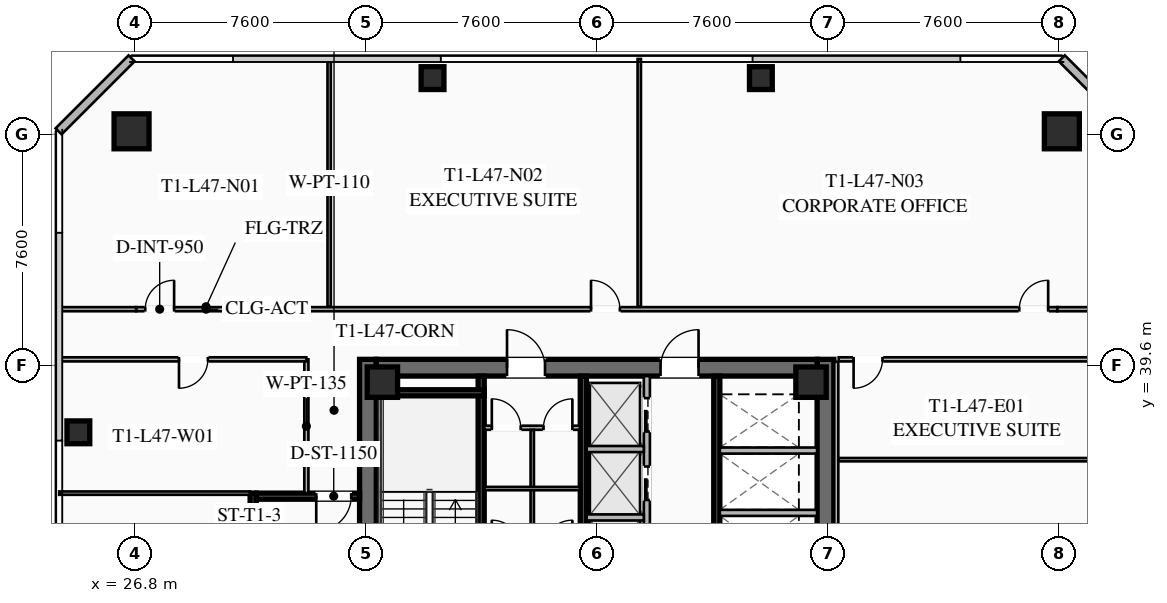
"""IFC4 building model, lengths in metres.
Left out: names, types, materials, properties, quantities, classifications, styles, units other than length and angle.
Written with IfcOpenShell. Run it as: python <this file> out.ifc"""

import sys

from ifc_helpers import new_model, si_unit, direction, frame, frame_2d, origin, origin_2d, place, context, subcontext, project, spatial, rectangle, hollow_rectangle, extrude, element, fill, save


model = new_model("IFC4")
c1 = context("Model", 3, precision=1e-05, world=origin(), true_north=direction((0.0, 1.0)))
c2 = subcontext(c1, "Body", "Model", "MODEL_VIEW")
j1 = project(units=[si_unit("LENGTHUNIT", "METRE"), si_unit("PLANEANGLEUNIT", "RADIAN")], contexts=[c1])
p1 = place(None, origin())
s1 = spatial("IfcSite", under=j1, at=p1, CompositionType="ELEMENT")
p2 = place(p1, origin())
s2 = spatial("IfcBuilding", under=s1, at=p2, CompositionType="ELEMENT")
p3 = place(p2, frame((0.0, 0.0, 174.75)))
s3 = spatial("IfcBuildingStorey", under=s2, at=p3, CompositionType="ELEMENT", Elevation=174.75)
for number, where, z_axis, x_axis in (
    (1, (34.475, 24.2, 0.0), (0.0, 0.0, 1.0), (0.0, 1.0, 0.0)),
    (2, (49.525, 39.8, 0.0), (0.0, 0.0, 1.0), (0.0, -1.0, 0.0)),
):
    element("IfcWall", number, at=place(p3, frame(where, z_axis=z_axis, x_axis=x_axis)), inside=s3, PredefinedType="SHEAR", context=c2, shape_type="SweptSolid", body=[
        extrude(rectangle(XDim=15.6, YDim=0.55, at=frame_2d((7.8, 0.0))), origin(), (0.0, 0.0, 1.0), 3.55),
    ])
p4 = place(p3, frame((34.75, 39.525, 0.0), z_axis=(0.0, 0.0, 1.0), x_axis=(1.0, 0.0, 0.0)))
e3 = element("IfcWall", 3, at=p4, inside=s3, PredefinedType="SHEAR", context=c2, shape_type="SweptSolid", body=[
    extrude(rectangle(XDim=14.5, YDim=0.55, at=frame_2d((7.25, 0.0))), origin(), (0.0, 0.0, 1.0), 3.55),
])
p5 = place(p4, frame((4.3, 0.0, 0.0)))
e4 = element("IfcOpeningElement", 4, at=p5, cuts=e3, PredefinedType="OPENING", context=c2, shape_type="SweptSolid", body=[
    extrude(rectangle(XDim=1.25, YDim=2.25, at=frame_2d((0.625, 1.125))), frame((0.0, 0.285, 0.0), z_axis=(0.0, -1.0, 0.0), x_axis=(1.0, 0.0, 0.0)), (0.0, 0.0, 1.0), 0.57),
])
p6 = place(p4, frame((9.35, 0.0, 0.0)))
e5 = element("IfcOpeningElement", 5, at=p6, cuts=e3, PredefinedType="OPENING", context=c2, shape_type="SweptSolid", body=[
    extrude(rectangle(XDim=1.25, YDim=2.25, at=frame_2d((0.625, 1.125))), frame((0.0, 0.285, 0.0), z_axis=(0.0, -1.0, 0.0), x_axis=(1.0, 0.0, 0.0)), (0.0, 0.0, 1.0), 0.57),
])
for number, where, z_axis, x_axis in (
    (6, (49.05, 39.05, 0.0), (0.0, 0.0, 1.0), (1.0, 0.0, 0.0)),
    (7, (34.95, 39.05, 0.0), (0.0, 0.0, 1.0), (1.0, 0.0, 0.0)),
):
    element("IfcColumn", number, at=place(p3, frame(where, z_axis=z_axis, x_axis=x_axis)), inside=s3, PredefinedType="COLUMN", context=c2, shape_type="SweptSolid", body=[
        extrude(hollow_rectangle(XDim=1.0, YDim=1.0, WallThickness=0.04, at=origin_2d()), origin(), (0.0, 0.0, 1.0), 3.37),
    ])
for number, where, z_axis, x_axis in (
    (8, (57.3, 47.3, 0.0), (0.0, 0.0, 1.0), (1.0, 0.0, 0.0)),
    (9, (26.7, 47.3, 0.0), (0.0, 0.0, 1.0), (1.0, 0.0, 0.0)),
):
    element("IfcColumn", number, at=place(p3, frame(where, z_axis=z_axis, x_axis=x_axis)), inside=s3, PredefinedType="COLUMN", context=c2, shape_type="SweptSolid", body=[
        extrude(hollow_rectangle(XDim=1.15, YDim=1.15, WallThickness=0.045, at=origin_2d()), origin(), (0.0, 0.0, 1.0), 3.37),
    ])
for number, where, z_axis, x_axis in (
    (10, (47.4, 49.05, 0.0), (0.0, 0.0, 1.0), (1.0, 0.0, 0.0)),
    (11, (36.6, 49.05, 0.0), (0.0, 0.0, 1.0), (1.0, 0.0, 0.0)),
    (12, (24.95, 37.4, 0.0), (0.0, 0.0, 1.0), (1.0, 0.0, 0.0)),
):
    element("IfcColumn", number, at=place(p3, frame(where, z_axis=z_axis, x_axis=x_axis)), inside=s3, PredefinedType="COLUMN", context=c2, shape_type="SweptSolid", body=[
        extrude(hollow_rectangle(XDim=0.75, YDim=0.75, WallThickness=0.032, at=origin_2d()), origin(), (0.0, 0.0, 1.0), 3.37),
    ])
for number, where, z_axis, x_axis in (
    (13, (24.3, 47.3, 0.0), (0.0, 0.0, 1.0), (0.707, 0.707, 0.0)),
    (14, (57.3, 49.7, 0.0), (0.0, 0.0, 1.0), (0.707, -0.707, 0.0)),
):
    element("IfcWall", number, at=place(p3, frame(where, z_axis=z_axis, x_axis=x_axis)), inside=s3, PredefinedType="SOLIDWALL", context=c2, shape_type="SweptSolid", body=[
        extrude(rectangle(XDim=3.394, YDim=0.28, at=frame_2d((1.697, 0.0))), origin(), (0.0, 0.0, 1.0), 3.37),
    ])
p7 = place(p3, frame((38.2, 31.2, 0.0), z_axis=(0.0, 0.0, 1.0), x_axis=(0.0, 1.0, 0.0)))
e15 = element("IfcWall", 15, at=p7, inside=s3, PredefinedType="SHEAR", context=c2, shape_type="SweptSolid", body=[
    extrude(rectangle(XDim=8.05, YDim=0.2, at=frame_2d((4.025, 0.0))), origin(), (0.0, 0.0, 1.0), 3.37),
])
p8 = place(p7, frame((0.45, 0.0, 0.0)))
e16 = element("IfcOpeningElement", 16, at=p8, cuts=e15, PredefinedType="OPENING", context=c2, shape_type="SweptSolid", body=[
    extrude(rectangle(XDim=1.15, YDim=2.2, at=frame_2d((0.575, 1.1))), frame((0.0, 0.11, 0.0), z_axis=(0.0, -1.0, 0.0), x_axis=(1.0, 0.0, 0.0)), (0.0, 0.0, 1.0), 0.22),
])
p9 = place(p3, frame((34.75, 38.7, 0.0), z_axis=(0.0, 0.0, 1.0), x_axis=(1.0, 0.0, 0.0)))
e17 = element("IfcWall", 17, at=p9, inside=s3, PredefinedType="SHEAR", context=c2, shape_type="SweptSolid", body=[
    extrude(rectangle(XDim=3.55, YDim=0.2, at=frame_2d((1.775, 0.0))), origin(), (0.0, 0.0, 1.0), 3.37),
])
p10 = place(p3, frame((41.56, 24.75, 0.0), z_axis=(0.0, 0.0, 1.0), x_axis=(0.0, 1.0, 0.0)))
e18 = element("IfcWall", 18, at=p10, inside=s3, PredefinedType="SHEAR", context=c2, shape_type="SweptSolid", body=[
    extrude(rectangle(XDim=14.5, YDim=0.2, at=frame_2d((7.25, 0.0))), origin(), (0.0, 0.0, 1.0), 3.37),
])
p11 = place(p3, frame((45.95, 39.25, 0.0), z_axis=(0.0, 0.0, 1.0), x_axis=(0.0, -1.0, 0.0)))
e19 = element("IfcWall", 19, at=p11, inside=s3, PredefinedType="SHEAR", context=c2, shape_type="SweptSolid", body=[
    extrude(rectangle(XDim=6.45, YDim=0.2, at=frame_2d((3.225, 0.0))), origin(), (0.0, 0.0, 1.0), 3.37),
])
for number, where, z_axis, x_axis in (
    (20, (46.05, 34.75, 0.0), (0.0, 0.0, 1.0), (1.0, 0.0, 0.0)),
    (21, (46.05, 36.8, 0.0), (0.0, 0.0, 1.0), (1.0, 0.0, 0.0)),
):
    element("IfcWall", number, at=place(p3, frame(where, z_axis=z_axis, x_axis=x_axis)), inside=s3, PredefinedType="SOLIDWALL", context=c2, shape_type="SweptSolid", body=[
        extrude(rectangle(XDim=3.2, YDim=0.2, at=frame_2d((1.6, 0.0))), origin(), (0.0, 0.0, 1.0), 3.37),
    ])
p12 = place(p3, frame((38.3, 37.55, 0.0), z_axis=(0.0, 0.0, 1.0), x_axis=(1.0, 0.0, 0.0)))
e22 = element("IfcWall", 22, at=p12, inside=s3, PredefinedType="PARTITIONING", context=c2, shape_type="SweptSolid", body=[
    extrude(rectangle(XDim=3.15, YDim=0.135, at=frame_2d((1.575, 0.0))), origin(), (0.0, 0.0, 1.0), 2.723),
])
p13 = place(p12, frame((0.25, 0.0, 0.0)))
e23 = element("IfcOpeningElement", 23, at=p13, cuts=e22, PredefinedType="OPENING", context=c2, shape_type="SweptSolid", body=[
    extrude(rectangle(XDim=0.95, YDim=2.05, at=frame_2d((0.475, 1.025))), frame((0.0, 0.077, 0.0), z_axis=(0.0, -1.0, 0.0), x_axis=(1.0, 0.0, 0.0)), (0.0, 0.0, 1.0), 0.155),
])
p14 = place(p12, frame((1.95, 0.0, 0.0)))
e24 = element("IfcOpeningElement", 24, at=p14, cuts=e22, PredefinedType="OPENING", context=c2, shape_type="SweptSolid", body=[
    extrude(rectangle(XDim=0.95, YDim=2.05, at=frame_2d((0.475, 1.025))), frame((0.0, 0.077, 0.0), z_axis=(0.0, -1.0, 0.0), x_axis=(1.0, 0.0, 0.0)), (0.0, 0.0, 1.0), 0.155),
])
p15 = place(p3, frame((39.88, 33.68, 0.0), z_axis=(0.0, 0.0, 1.0), x_axis=(0.0, 1.0, 0.0)))
e25 = element("IfcWall", 25, at=p15, inside=s3, PredefinedType="PARTITIONING", context=c2, shape_type="SweptSolid", body=[
    extrude(rectangle(XDim=3.8, YDim=0.11, at=frame_2d((1.9, 0.0))), origin(), (0.0, 0.0, 1.0), 2.723),
])
p16 = place(p3, frame((38.3, 35.55, 0.0), z_axis=(0.0, 0.0, 1.0), x_axis=(1.0, 0.0, 0.0)))
e26 = element("IfcWall", 26, at=p16, inside=s3, PredefinedType="PARTITIONING", context=c2, shape_type="SweptSolid", body=[
    extrude(rectangle(XDim=3.15, YDim=0.11, at=frame_2d((1.575, 0.0))), origin(), (0.0, 0.0, 1.0), 2.723),
])
p17 = place(p3, frame((43.65, 32.35, 0.0), z_axis=(0.0, 0.0, 1.0), x_axis=(0.0, 1.0, 0.0)))
e27 = element("IfcWall", 27, at=p17, inside=s3, PredefinedType="SOLIDWALL", context=c2, shape_type="SweptSolid", body=[
    extrude(rectangle(XDim=6.9, YDim=0.2, at=frame_2d((3.45, 0.0))), origin(), (0.0, 0.0, 1.0), 3.37),
])
p18 = place(p17, frame((0.575, 0.0, 0.0)))
e28 = element("IfcOpeningElement", 28, at=p18, cuts=e27, PredefinedType="OPENING", context=c2, shape_type="SweptSolid", body=[
    extrude(rectangle(XDim=1.1, YDim=2.2, at=frame_2d((0.55, 1.1))), frame((0.0, 0.11, 0.0), z_axis=(0.0, -1.0, 0.0), x_axis=(1.0, 0.0, 0.0)), (0.0, 0.0, 1.0), 0.22),
])
p19 = place(p17, frame((2.825, 0.0, 0.0)))
e29 = element("IfcOpeningElement", 29, at=p19, cuts=e27, PredefinedType="OPENING", context=c2, shape_type="SweptSolid", body=[
    extrude(rectangle(XDim=1.1, YDim=2.2, at=frame_2d((0.55, 1.1))), frame((0.0, 0.11, 0.0), z_axis=(0.0, -1.0, 0.0), x_axis=(1.0, 0.0, 0.0)), (0.0, 0.0, 1.0), 0.22),
])
p20 = place(p17, frame((5.075, 0.0, 0.0)))
e30 = element("IfcOpeningElement", 30, at=p20, cuts=e27, PredefinedType="OPENING", context=c2, shape_type="SweptSolid", body=[
    extrude(rectangle(XDim=1.1, YDim=2.2, at=frame_2d((0.55, 1.1))), frame((0.0, 0.11, 0.0), z_axis=(0.0, -1.0, 0.0), x_axis=(1.0, 0.0, 0.0)), (0.0, 0.0, 1.0), 0.22),
])
for number, where, z_axis, x_axis in (
    (31, (41.67, 34.6, 0.0), (0.0, 0.0, 1.0), (1.0, 0.0, 0.0)),
    (32, (41.67, 36.85, 0.0), (0.0, 0.0, 1.0), (1.0, 0.0, 0.0)),
):
    element("IfcWall", number, at=place(p3, frame(where, z_axis=z_axis, x_axis=x_axis)), inside=s3, PredefinedType="SOLIDWALL", context=c2, shape_type="SweptSolid", body=[
        extrude(rectangle(XDim=1.88, YDim=0.2, at=frame_2d((0.94, 0.0))), origin(), (0.0, 0.0, 1.0), 3.37),
    ])
p21 = place(p3, frame((30.7, 28.6, 0.0), z_axis=(0.0, 0.0, 1.0), x_axis=(0.0, 1.0, 0.0)))
e33 = element("IfcWall", 33, at=p21, inside=s3, PredefinedType="SHEAR", context=c2, shape_type="SweptSolid", body=[
    extrude(rectangle(XDim=6.8, YDim=0.2, at=frame_2d((3.4, 0.0))), origin(), (0.0, 0.0, 1.0), 3.37),
])
p22 = place(p3, frame((34.2, 35.3, 0.0), z_axis=(0.0, 0.0, 1.0), x_axis=(-1.0, 0.0, 0.0)))
e34 = element("IfcWall", 34, at=p22, inside=s3, PredefinedType="SHEAR", context=c2, shape_type="SweptSolid", body=[
    extrude(rectangle(XDim=3.4, YDim=0.2, at=frame_2d((1.7, 0.0))), origin(), (0.0, 0.0, 1.0), 3.37),
])
p23 = place(p22, frame((0.275, 0.0, 0.0)))
e35 = element("IfcOpeningElement", 35, at=p23, cuts=e34, PredefinedType="OPENING", context=c2, shape_type="SweptSolid", body=[
    extrude(rectangle(XDim=1.15, YDim=2.2, at=frame_2d((0.575, 1.1))), frame((0.0, 0.11, 0.0), z_axis=(0.0, -1.0, 0.0), x_axis=(1.0, 0.0, 0.0)), (0.0, 0.0, 1.0), 0.22),
])
p24 = place(p3, frame((32.45, 35.4, 0.0), z_axis=(0.0, 0.0, 1.0), x_axis=(0.0, 1.0, 0.0)))
e36 = element("IfcWall", 36, at=p24, inside=s3, PredefinedType="PARTITIONING", context=c2, shape_type="SweptSolid", body=[
    extrude(rectangle(XDim=4.4, YDim=0.135, at=frame_2d((2.2, 0.0))), origin(), (0.0, 0.0, 1.0), 2.723),
])
p25 = place(p3, frame((26.85, 41.45, 0.0), z_axis=(0.0, 0.0, 1.0), x_axis=(1.0, 0.0, 0.0)))
e37 = element("IfcWall", 37, at=p25, inside=s3, PredefinedType="PARTITIONING", context=c2, shape_type="SweptSolid", body=[
    extrude(rectangle(XDim=30.3, YDim=0.135, at=frame_2d((15.15, 0.0))), origin(), (0.0, 0.0, 1.0), 2.723),
])
p26 = place(p25, frame((0.3, 0.0, 0.0)))
e38 = element("IfcOpeningElement", 38, at=p26, cuts=e37, PredefinedType="OPENING", context=c2, shape_type="SweptSolid", body=[
    extrude(rectangle(XDim=0.95, YDim=2.05, at=frame_2d((0.475, 1.025))), frame((0.0, 0.077, 0.0), z_axis=(0.0, -1.0, 0.0), x_axis=(1.0, 0.0, 0.0)), (0.0, 0.0, 1.0), 0.155),
])
p27 = place(p25, frame((14.963, 0.0, 0.0)))
e39 = element("IfcOpeningElement", 39, at=p27, cuts=e37, PredefinedType="OPENING", context=c2, shape_type="SweptSolid", body=[
    extrude(rectangle(XDim=0.95, YDim=2.05, at=frame_2d((0.475, 1.025))), frame((0.0, 0.077, 0.0), z_axis=(0.0, -1.0, 0.0), x_axis=(1.0, 0.0, 0.0)), (0.0, 0.0, 1.0), 0.155),
])
p28 = place(p25, frame((29.05, 0.0, 0.0)))
e40 = element("IfcOpeningElement", 40, at=p28, cuts=e37, PredefinedType="OPENING", context=c2, shape_type="SweptSolid", body=[
    extrude(rectangle(XDim=0.95, YDim=2.05, at=frame_2d((0.475, 1.025))), frame((0.0, 0.077, 0.0), z_axis=(0.0, -1.0, 0.0), x_axis=(1.0, 0.0, 0.0)), (0.0, 0.0, 1.0), 0.155),
])
for number, where, z_axis, x_axis in (
    (41, (24.32, 41.45, 0.0), (0.0, 0.0, 1.0), (1.0, 0.0, 0.0)),
    (42, (57.15, 41.45, 0.0), (0.0, 0.0, 1.0), (1.0, 0.0, 0.0)),
):
    element("IfcWall", number, at=place(p3, frame(where, z_axis=z_axis, x_axis=x_axis)), inside=s3, PredefinedType="PARTITIONING", context=c2, shape_type="SweptSolid", body=[
        extrude(rectangle(XDim=2.53, YDim=0.135, at=frame_2d((1.265, 0.0))), origin(), (0.0, 0.0, 1.0), 2.723),
    ])
for number, where, z_axis, x_axis in (
    (43, (33.2, 41.53, 0.0), (0.0, 0.0, 1.0), (0.0, 1.0, 0.0)),
    (44, (43.4, 41.53, 0.0), (0.0, 0.0, 1.0), (0.0, 1.0, 0.0)),
):
    element("IfcWall", number, at=place(p3, frame(where, z_axis=z_axis, x_axis=x_axis)), inside=s3, PredefinedType="PARTITIONING", context=c2, shape_type="SweptSolid", body=[
        extrude(rectangle(XDim=8.15, YDim=0.11, at=frame_2d((4.075, 0.0))), origin(), (0.0, 0.0, 1.0), 2.723),
    ])
p29 = place(p3, frame((49.88, 39.72, 0.0), z_axis=(0.0, 0.0, 1.0), x_axis=(0.0, -1.0, 0.0)))
e45 = element("IfcWall", 45, at=p29, inside=s3, PredefinedType="PARTITIONING", context=c2, shape_type="SweptSolid", body=[
    extrude(rectangle(XDim=15.44, YDim=0.135, at=frame_2d((7.72, 0.0))), origin(), (0.0, 0.0, 1.0), 2.723),
])
p30 = place(p3, frame((59.53, 39.8, 0.0), z_axis=(0.0, 0.0, 1.0), x_axis=(-1.0, 0.0, 0.0)))
e46 = element("IfcWall", 46, at=p30, inside=s3, PredefinedType="PARTITIONING", context=c2, shape_type="SweptSolid", body=[
    extrude(rectangle(XDim=9.57, YDim=0.135, at=frame_2d((4.785, 0.0))), origin(), (0.0, 0.0, 1.0), 2.723),
])
p31 = place(p30, frame((8.13, 0.0, 0.0)))
e47 = element("IfcOpeningElement", 47, at=p31, cuts=e46, PredefinedType="OPENING", context=c2, shape_type="SweptSolid", body=[
    extrude(rectangle(XDim=0.95, YDim=2.05, at=frame_2d((0.475, 1.025))), frame((0.0, 0.077, 0.0), z_axis=(0.0, -1.0, 0.0), x_axis=(1.0, 0.0, 0.0)), (0.0, 0.0, 1.0), 0.155),
])
p32 = place(p3, frame((49.96, 36.5, 0.0), z_axis=(0.0, 0.0, 1.0), x_axis=(1.0, 0.0, 0.0)))
e48 = element("IfcWall", 48, at=p32, inside=s3, PredefinedType="PARTITIONING", context=c2, shape_type="SweptSolid", body=[
    extrude(rectangle(XDim=9.57, YDim=0.11, at=frame_2d((4.785, 0.0))), origin(), (0.0, 0.0, 1.0), 2.723),
])
p33 = place(p3, frame((32.45, 39.8, 0.0), z_axis=(0.0, 0.0, 1.0), x_axis=(-1.0, 0.0, 0.0)))
e49 = element("IfcWall", 49, at=p33, inside=s3, PredefinedType="PARTITIONING", context=c2, shape_type="SweptSolid", body=[
    extrude(rectangle(XDim=8.13, YDim=0.135, at=frame_2d((4.065, 0.0))), origin(), (0.0, 0.0, 1.0), 2.723),
])
p34 = place(p33, frame((3.24, 0.0, 0.0)))
e50 = element("IfcOpeningElement", 50, at=p34, cuts=e49, PredefinedType="OPENING", context=c2, shape_type="SweptSolid", body=[
    extrude(rectangle(XDim=0.95, YDim=2.05, at=frame_2d((0.475, 1.025))), frame((0.0, 0.077, 0.0), z_axis=(0.0, -1.0, 0.0), x_axis=(1.0, 0.0, 0.0)), (0.0, 0.0, 1.0), 0.155),
])
p35 = place(p3, frame((30.6, 35.4, 0.0), z_axis=(0.0, 0.0, 1.0), x_axis=(-1.0, 0.0, 0.0)))
e51 = element("IfcWall", 51, at=p35, inside=s3, PredefinedType="PARTITIONING", context=c2, shape_type="SweptSolid", body=[
    extrude(rectangle(XDim=6.28, YDim=0.11, at=frame_2d((3.14, 0.0))), origin(), (0.0, 0.0, 1.0), 2.723),
])
p36 = place(p5, origin())
e52 = element("IfcDoor", 52, at=p36, inside=s3, OperationType="SINGLE_SWING_LEFT", PredefinedType="DOOR", context=c2, shape_type="SweptSolid", body=[
    extrude(rectangle(XDim=1.25, YDim=2.25, at=frame_2d((0.625, 1.125))), frame((0.0, 0.025, 0.0), z_axis=(0.0, -1.0, 0.0), x_axis=(1.0, 0.0, 0.0)), (0.0, 0.0, 1.0), 0.05),
])
fill(e4, e52)
p37 = place(p6, origin())
e53 = element("IfcDoor", 53, at=p37, inside=s3, OperationType="SINGLE_SWING_RIGHT", PredefinedType="DOOR", context=c2, shape_type="SweptSolid", body=[
    extrude(rectangle(XDim=1.25, YDim=2.25, at=frame_2d((0.625, 1.125))), frame((0.0, 0.025, 0.0), z_axis=(0.0, -1.0, 0.0), x_axis=(1.0, 0.0, 0.0)), (0.0, 0.0, 1.0), 0.05),
])
fill(e5, e53)
p38 = place(p13, origin())
e54 = element("IfcDoor", 54, at=p38, inside=s3, OperationType="SINGLE_SWING_LEFT", PredefinedType="DOOR", context=c2, shape_type="SweptSolid", body=[
    extrude(rectangle(XDim=0.95, YDim=2.05, at=frame_2d((0.475, 1.025))), frame((0.0, 0.025, 0.0), z_axis=(0.0, -1.0, 0.0), x_axis=(1.0, 0.0, 0.0)), (0.0, 0.0, 1.0), 0.05),
])
fill(e23, e54)
p39 = place(p14, origin())
e55 = element("IfcDoor", 55, at=p39, inside=s3, OperationType="SINGLE_SWING_RIGHT", PredefinedType="DOOR", context=c2, shape_type="SweptSolid", body=[
    extrude(rectangle(XDim=0.95, YDim=2.05, at=frame_2d((0.475, 1.025))), frame((0.0, 0.025, 0.0), z_axis=(0.0, -1.0, 0.0), x_axis=(1.0, 0.0, 0.0)), (0.0, 0.0, 1.0), 0.05),
])
fill(e24, e55)
p40 = place(p23, origin())
e56 = element("IfcDoor", 56, at=p40, inside=s3, OperationType="SINGLE_SWING_RIGHT", PredefinedType="DOOR", context=c2, shape_type="SweptSolid", body=[
    extrude(rectangle(XDim=1.15, YDim=2.2, at=frame_2d((0.575, 1.1))), frame((0.0, 0.025, 0.0), z_axis=(0.0, -1.0, 0.0), x_axis=(1.0, 0.0, 0.0)), (0.0, 0.0, 1.0), 0.05),
])
fill(e35, e56)
p41 = place(p26, origin())
e57 = element("IfcDoor", 57, at=p41, inside=s3, OperationType="SINGLE_SWING_RIGHT", PredefinedType="DOOR", context=c2, shape_type="SweptSolid", body=[
    extrude(rectangle(XDim=0.95, YDim=2.05, at=frame_2d((0.475, 1.025))), frame((0.0, 0.025, 0.0), z_axis=(0.0, -1.0, 0.0), x_axis=(1.0, 0.0, 0.0)), (0.0, 0.0, 1.0), 0.05),
])
fill(e38, e57)
p42 = place(p27, origin())
e58 = element("IfcDoor", 58, at=p42, inside=s3, OperationType="SINGLE_SWING_LEFT", PredefinedType="DOOR", context=c2, shape_type="SweptSolid", body=[
    extrude(rectangle(XDim=0.95, YDim=2.05, at=frame_2d((0.475, 1.025))), frame((0.0, 0.025, 0.0), z_axis=(0.0, -1.0, 0.0), x_axis=(1.0, 0.0, 0.0)), (0.0, 0.0, 1.0), 0.05),
])
fill(e39, e58)
p43 = place(p28, origin())
e59 = element("IfcDoor", 59, at=p43, inside=s3, OperationType="SINGLE_SWING_RIGHT", PredefinedType="DOOR", context=c2, shape_type="SweptSolid", body=[
    extrude(rectangle(XDim=0.95, YDim=2.05, at=frame_2d((0.475, 1.025))), frame((0.0, 0.025, 0.0), z_axis=(0.0, -1.0, 0.0), x_axis=(1.0, 0.0, 0.0)), (0.0, 0.0, 1.0), 0.05),
])
fill(e40, e59)
p44 = place(p31, origin())
e60 = element("IfcDoor", 60, at=p44, inside=s3, OperationType="SINGLE_SWING_RIGHT", PredefinedType="DOOR", context=c2, shape_type="SweptSolid", body=[
    extrude(rectangle(XDim=0.95, YDim=2.05, at=frame_2d((0.475, 1.025))), frame((0.0, 0.025, 0.0), z_axis=(0.0, -1.0, 0.0), x_axis=(1.0, 0.0, 0.0)), (0.0, 0.0, 1.0), 0.05),
])
fill(e47, e60)
p45 = place(p34, origin())
e61 = element("IfcDoor", 61, at=p45, inside=s3, OperationType="SINGLE_SWING_RIGHT", PredefinedType="DOOR", context=c2, shape_type="SweptSolid", body=[
    extrude(rectangle(XDim=0.95, YDim=2.05, at=frame_2d((0.475, 1.025))), frame((0.0, 0.025, 0.0), z_axis=(0.0, -1.0, 0.0), x_axis=(1.0, 0.0, 0.0)), (0.0, 0.0, 1.0), 0.05),
])
fill(e50, e61)
p46 = place(p19, origin())
e62 = element("IfcDoor", 62, at=p46, inside=s3, OperationType="SLIDING_TO_LEFT", PredefinedType="DOOR", context=c2, shape_type="SweptSolid", body=[
    extrude(rectangle(XDim=1.1, YDim=2.2, at=frame_2d((0.55, 1.1))), frame((0.0, 0.025, 0.0), z_axis=(0.0, -1.0, 0.0), x_axis=(1.0, 0.0, 0.0)), (0.0, 0.0, 1.0), 0.05),
])
fill(e29, e62)
p47 = place(p20, origin())
e63 = element("IfcDoor", 63, at=p47, inside=s3, OperationType="SLIDING_TO_LEFT", PredefinedType="DOOR", context=c2, shape_type="SweptSolid", body=[
    extrude(rectangle(XDim=1.1, YDim=2.2, at=frame_2d((0.55, 1.1))), frame((0.0, 0.025, 0.0), z_axis=(0.0, -1.0, 0.0), x_axis=(1.0, 0.0, 0.0)), (0.0, 0.0, 1.0), 0.05),
])
fill(e30, e63)
save(model, sys.argv[1])
